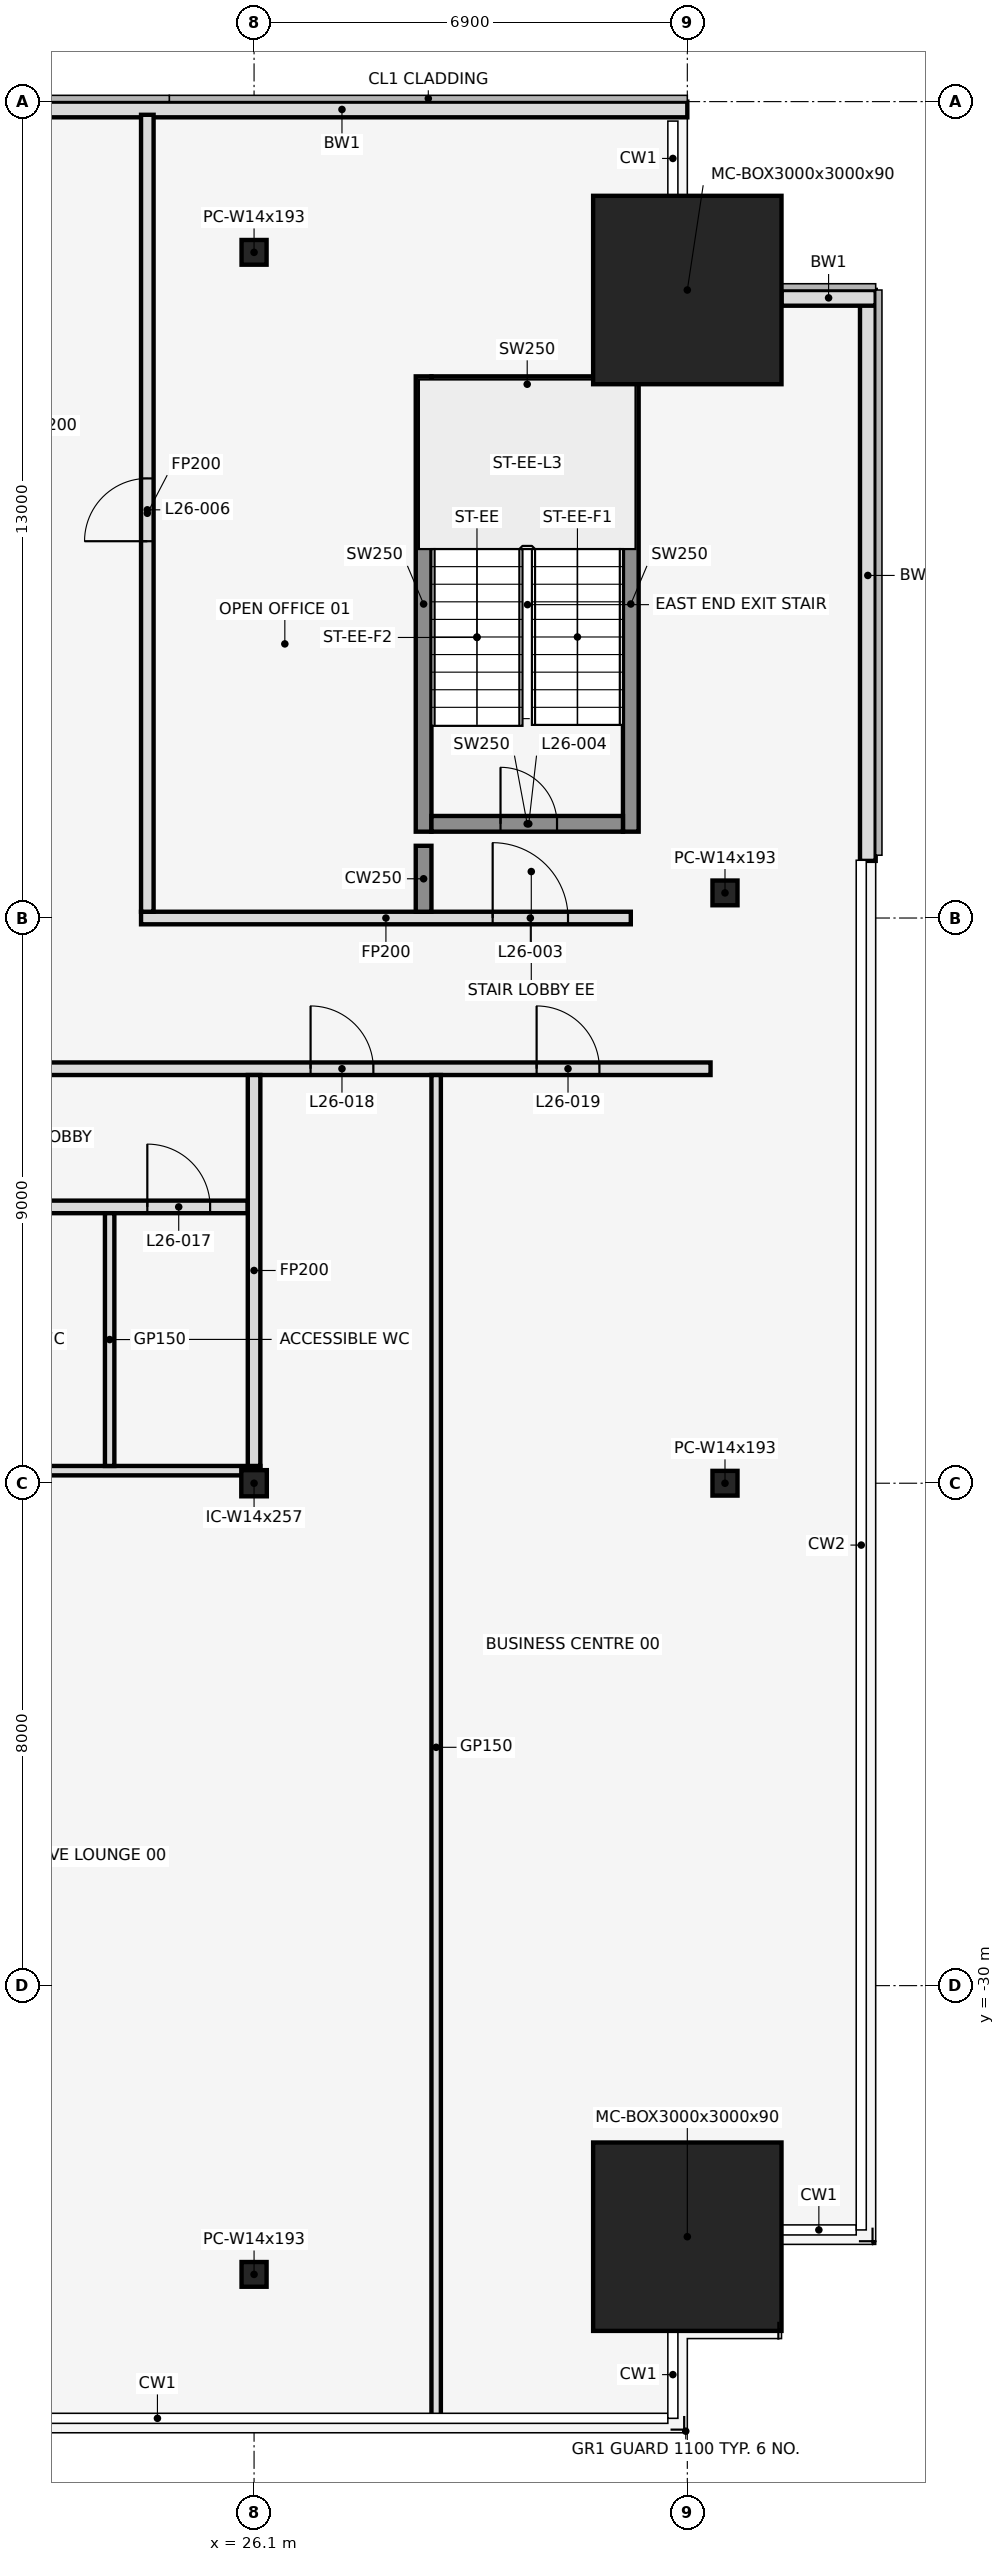
"""IFC4 building model, lengths in metres.
Left out: names, types, materials, properties, quantities, classifications, styles, units other than length and angle.
Written with IfcOpenShell. Run it as: python <this file> out.ifc"""

import sys

from ifc_helpers import new_model, si_unit, direction, frame, frame_2d, origin, origin_2d, place, context, subcontext, project, spatial, rectangle, hollow_rectangle, i_section, extrude, element, fill, save


model = new_model("IFC4")
c1 = context("Model", 3, precision=1e-05, world=origin(), true_north=direction((0.0, 1.0)))
c2 = subcontext(c1, "Body", "Model", "MODEL_VIEW")
j1 = project(units=[si_unit("LENGTHUNIT", "METRE"), si_unit("PLANEANGLEUNIT", "RADIAN")], contexts=[c1])
p1 = place(None, origin())
s1 = spatial("IfcSite", under=j1, at=p1, CompositionType="ELEMENT")
p2 = place(p1, origin())
s2 = spatial("IfcBuilding", under=s1, at=p2, CompositionType="ELEMENT")
p3 = place(p2, frame((0.0, 0.0, 122.7)))
s3 = spatial("IfcBuildingStorey", under=s2, at=p3, CompositionType="ELEMENT", Elevation=122.7)
for number, where, z_axis, x_axis in (
    (1, (26.1, -34.598, 0.0), (0.0, 0.0, 1.0), (1.0, 0.0, 0.0)),
    (2, (26.1, -2.4, 0.0), (0.0, 0.0, 1.0), (1.0, 0.0, 0.0)),
):
    element("IfcColumn", number, at=place(p3, frame(where, z_axis=z_axis, x_axis=x_axis)), inside=s3, PredefinedType="COLUMN", context=c2, shape_type="SweptSolid", body=[
        extrude(i_section(OverallWidth=0.399, OverallDepth=0.394, WebThickness=0.023, FlangeThickness=0.037, at=origin_2d()), origin(), (0.0, 0.0, 1.0), 4.1),
    ])
for number, where, z_axis, x_axis in (
    (3, (33.0, -33.998, 0.0), (0.0, 0.0, 1.0), (1.0, 0.0, 0.0)),
    (4, (33.0, -3.0, 0.0), (0.0, 0.0, 1.0), (1.0, 0.0, 0.0)),
):
    element("IfcColumn", number, at=place(p3, frame(where, z_axis=z_axis, x_axis=x_axis)), inside=s3, PredefinedType="COLUMN", context=c2, shape_type="SweptSolid", body=[
        extrude(hollow_rectangle(XDim=3.0, YDim=3.0, WallThickness=0.09, at=origin_2d()), origin(), (0.0, 0.0, 1.0), 4.1),
    ])
for number, where, z_axis, x_axis in (
    (5, (33.6, -12.6, 0.0), (0.0, 0.0, 1.0), (1.0, 0.0, 0.0)),
    (6, (33.6, -22.0, 0.0), (0.0, 0.0, 1.0), (1.0, 0.0, 0.0)),
):
    element("IfcColumn", number, at=place(p3, frame(where, z_axis=z_axis, x_axis=x_axis)), inside=s3, PredefinedType="COLUMN", context=c2, shape_type="SweptSolid", body=[
        extrude(i_section(OverallWidth=0.399, OverallDepth=0.394, WebThickness=0.023, FlangeThickness=0.037, at=origin_2d()), origin(), (0.0, 0.0, 1.0), 4.1),
    ])
p4 = place(p3, frame((26.1, -22.0, 0.0), z_axis=(0.0, 0.0, 1.0), x_axis=(1.0, 0.0, 0.0)))
e7 = element("IfcColumn", 7, at=p4, inside=s3, PredefinedType="COLUMN", context=c2, shape_type="SweptSolid", body=[
    extrude(i_section(OverallWidth=0.406, OverallDepth=0.417, WebThickness=0.03, FlangeThickness=0.048, at=origin_2d()), origin(), (0.0, 0.0, 1.0), 4.1),
])
p5 = place(p3, frame((33.0, -0.125, 0.0), z_axis=(0.0, 0.0, 1.0), x_axis=(-1.0, 0.0, 0.0)))
e8 = element("IfcWall", 8, at=p5, inside=s3, PredefinedType="STANDARD", context=c2, shape_type="SweptSolid", body=[
    extrude(rectangle(XDim=11.0, YDim=0.25, at=frame_2d((5.5, 0.0))), origin(), (0.0, 0.0, 1.0), 3.95),
])
p6 = place(p3, frame((35.875, -12.09, 0.0), z_axis=(0.0, 0.0, 1.0), x_axis=(0.0, 1.0, 0.0)))
e9 = element("IfcWall", 9, at=p6, inside=s3, PredefinedType="STANDARD", context=c2, shape_type="SweptSolid", body=[
    extrude(rectangle(XDim=9.09, YDim=0.25, at=frame_2d((4.545, 0.0))), origin(), (0.0, 0.0, 1.0), 3.95),
])
p7 = place(p3, frame((36.0, -3.125, 0.0), z_axis=(0.0, 0.0, 1.0), x_axis=(-1.0, 0.0, 0.0)))
e10 = element("IfcWall", 10, at=p7, inside=s3, PredefinedType="STANDARD", context=c2, shape_type="SweptSolid", body=[
    extrude(rectangle(XDim=1.5, YDim=0.25, at=frame_2d((0.75, 0.0))), origin(), (0.0, 0.0, 1.0), 3.95),
])
for number, where, z_axis, x_axis in (
    (11, (28.8, -11.625, 0.0), (0.0, 0.0, 1.0), (0.0, 1.0, 0.0)),
    (12, (32.1, -11.625, 0.0), (0.0, 0.0, 1.0), (0.0, 1.0, 0.0)),
):
    element("IfcWall", number, at=place(p3, frame(where, z_axis=z_axis, x_axis=x_axis)), inside=s3, PredefinedType="SHEAR", context=c2, shape_type="SweptSolid", body=[
        extrude(rectangle(XDim=7.25, YDim=0.25, at=frame_2d((3.625, 0.0))), origin(), (0.0, 0.0, 1.0), 4.1),
    ])
p8 = place(p3, frame((28.925, -11.5, 0.0), z_axis=(0.0, 0.0, 1.0), x_axis=(1.0, 0.0, 0.0)))
e13 = element("IfcWall", 13, at=p8, inside=s3, PredefinedType="SHEAR", context=c2, shape_type="SweptSolid", body=[
    extrude(rectangle(XDim=3.05, YDim=0.25, at=frame_2d((1.525, 0.0))), origin(), (0.0, 0.0, 1.0), 4.1),
])
p9 = place(p8, frame((1.1, 0.0, 0.0)))
e14 = element("IfcOpeningElement", 14, at=p9, cuts=e13, PredefinedType="OPENING", context=c2, shape_type="SweptSolid", body=[
    extrude(rectangle(XDim=0.9, YDim=2.1, at=frame_2d((0.45, 1.05))), frame((0.0, 0.137, 0.0), z_axis=(0.0, -1.0, 0.0), x_axis=(1.0, 0.0, 0.0)), (0.0, 0.0, 1.0), 0.274),
])
p10 = place(p3, frame((28.925, -4.5, 0.0), z_axis=(0.0, 0.0, 1.0), x_axis=(1.0, 0.0, 0.0)))
e15 = element("IfcWall", 15, at=p10, inside=s3, PredefinedType="SHEAR", context=c2, shape_type="SweptSolid", body=[
    extrude(rectangle(XDim=3.05, YDim=0.25, at=frame_2d((1.525, 0.0))), origin(), (0.0, 0.0, 1.0), 4.1),
])
p11 = place(p3, frame((17.5, -21.8, 0.0), z_axis=(0.0, 0.0, 1.0), x_axis=(1.0, 0.0, 0.0)))
e16 = element("IfcWall", 16, at=p11, inside=s3, PredefinedType="PARTITIONING", context=c2, shape_type="SweptSolid", body=[
    extrude(rectangle(XDim=8.7, YDim=0.15, at=frame_2d((4.35, 0.0))), origin(), (0.0, 0.0, 1.0), 3.018),
])
p12 = place(p3, frame((17.5, -17.6, 0.0), z_axis=(0.0, 0.0, 1.0), x_axis=(1.0, 0.0, 0.0)))
e17 = element("IfcWall", 17, at=p12, inside=s3, PredefinedType="PARTITIONING", context=c2, shape_type="SweptSolid", body=[
    extrude(rectangle(XDim=8.5, YDim=0.2, at=frame_2d((4.25, 0.0))), origin(), (0.0, 0.0, 1.0), 3.018),
])
p13 = place(p12, frame((1.1, 0.0, 0.0)))
e18 = element("IfcOpeningElement", 18, at=p13, cuts=e17, PredefinedType="OPENING", context=c2, shape_type="SweptSolid", body=[
    extrude(rectangle(XDim=0.9, YDim=2.1, at=frame_2d((0.45, 1.05))), frame((0.0, 0.112, 0.0), z_axis=(0.0, -1.0, 0.0), x_axis=(1.0, 0.0, 0.0)), (0.0, 0.0, 1.0), 0.224),
])
p14 = place(p12, frame((4.3, 0.0, 0.0)))
e19 = element("IfcOpeningElement", 19, at=p14, cuts=e17, PredefinedType="OPENING", context=c2, shape_type="SweptSolid", body=[
    extrude(rectangle(XDim=0.9, YDim=2.1, at=frame_2d((0.45, 1.05))), frame((0.0, 0.112, 0.0), z_axis=(0.0, -1.0, 0.0), x_axis=(1.0, 0.0, 0.0)), (0.0, 0.0, 1.0), 0.224),
])
p15 = place(p12, frame((6.9, 0.0, 0.0)))
e20 = element("IfcOpeningElement", 20, at=p15, cuts=e17, PredefinedType="OPENING", context=c2, shape_type="SweptSolid", body=[
    extrude(rectangle(XDim=1.0, YDim=2.1, at=frame_2d((0.5, 1.05))), frame((0.0, 0.112, 0.0), z_axis=(0.0, -1.0, 0.0), x_axis=(1.0, 0.0, 0.0)), (0.0, 0.0, 1.0), 0.224),
])
p16 = place(p3, frame((-33.37, -15.4, 0.0), z_axis=(0.0, 0.0, 1.0), x_axis=(1.0, 0.0, 0.0)))
e21 = element("IfcWall", 21, at=p16, inside=s3, PredefinedType="PARTITIONING", context=c2, shape_type="SweptSolid", body=[
    extrude(rectangle(XDim=66.74, YDim=0.2, at=frame_2d((33.37, 0.0))), origin(), (0.0, 0.0, 1.0), 3.018),
])
p17 = place(p16, frame((1.7, 0.0, 0.0)))
e22 = element("IfcOpeningElement", 22, at=p17, cuts=e21, PredefinedType="OPENING", context=c2, shape_type="SweptSolid", body=[
    extrude(rectangle(XDim=1.0, YDim=2.1, at=frame_2d((0.5, 1.05))), frame((0.0, 0.112, 0.0), z_axis=(0.0, -1.0, 0.0), x_axis=(1.0, 0.0, 0.0)), (0.0, 0.0, 1.0), 0.224),
])
p18 = place(p16, frame((11.07, 0.0, 0.0)))
e23 = element("IfcOpeningElement", 23, at=p18, cuts=e21, PredefinedType="OPENING", context=c2, shape_type="SweptSolid", body=[
    extrude(rectangle(XDim=1.0, YDim=2.1, at=frame_2d((0.5, 1.05))), frame((0.0, 0.112, 0.0), z_axis=(0.0, -1.0, 0.0), x_axis=(1.0, 0.0, 0.0)), (0.0, 0.0, 1.0), 0.224),
])
p19 = place(p16, frame((20.87, 0.0, 0.0)))
e24 = element("IfcOpeningElement", 24, at=p19, cuts=e21, PredefinedType="OPENING", context=c2, shape_type="SweptSolid", body=[
    extrude(rectangle(XDim=1.8, YDim=2.1, at=frame_2d((0.9, 1.05))), frame((0.0, 0.112, 0.0), z_axis=(0.0, -1.0, 0.0), x_axis=(1.0, 0.0, 0.0)), (0.0, 0.0, 1.0), 0.224),
])
p20 = place(p16, frame((28.57, 0.0, 0.0)))
e25 = element("IfcOpeningElement", 25, at=p20, cuts=e21, PredefinedType="OPENING", context=c2, shape_type="SweptSolid", body=[
    extrude(rectangle(XDim=1.0, YDim=2.1, at=frame_2d((0.5, 1.05))), frame((0.0, 0.112, 0.0), z_axis=(0.0, -1.0, 0.0), x_axis=(1.0, 0.0, 0.0)), (0.0, 0.0, 1.0), 0.224),
])
p21 = place(p16, frame((36.77, 0.0, 0.0)))
e26 = element("IfcOpeningElement", 26, at=p21, cuts=e21, PredefinedType="OPENING", context=c2, shape_type="SweptSolid", body=[
    extrude(rectangle(XDim=1.8, YDim=2.1, at=frame_2d((0.9, 1.05))), frame((0.0, 0.112, 0.0), z_axis=(0.0, -1.0, 0.0), x_axis=(1.0, 0.0, 0.0)), (0.0, 0.0, 1.0), 0.224),
])
p22 = place(p16, frame((44.47, 0.0, 0.0)))
e27 = element("IfcOpeningElement", 27, at=p22, cuts=e21, PredefinedType="OPENING", context=c2, shape_type="SweptSolid", body=[
    extrude(rectangle(XDim=1.0, YDim=2.1, at=frame_2d((0.5, 1.05))), frame((0.0, 0.112, 0.0), z_axis=(0.0, -1.0, 0.0), x_axis=(1.0, 0.0, 0.0)), (0.0, 0.0, 1.0), 0.224),
])
p23 = place(p16, frame((48.77, 0.0, 0.0)))
e28 = element("IfcOpeningElement", 28, at=p23, cuts=e21, PredefinedType="OPENING", context=c2, shape_type="SweptSolid", body=[
    extrude(rectangle(XDim=1.0, YDim=2.1, at=frame_2d((0.5, 1.05))), frame((0.0, 0.112, 0.0), z_axis=(0.0, -1.0, 0.0), x_axis=(1.0, 0.0, 0.0)), (0.0, 0.0, 1.0), 0.224),
])
p24 = place(p16, frame((54.67, 0.0, 0.0)))
e29 = element("IfcOpeningElement", 29, at=p24, cuts=e21, PredefinedType="OPENING", context=c2, shape_type="SweptSolid", body=[
    extrude(rectangle(XDim=0.9, YDim=2.1, at=frame_2d((0.45, 1.05))), frame((0.0, 0.112, 0.0), z_axis=(0.0, -1.0, 0.0), x_axis=(1.0, 0.0, 0.0)), (0.0, 0.0, 1.0), 0.224),
])
p25 = place(p16, frame((60.37, 0.0, 0.0)))
e30 = element("IfcOpeningElement", 30, at=p25, cuts=e21, PredefinedType="OPENING", context=c2, shape_type="SweptSolid", body=[
    extrude(rectangle(XDim=1.0, YDim=2.1, at=frame_2d((0.5, 1.05))), frame((0.0, 0.112, 0.0), z_axis=(0.0, -1.0, 0.0), x_axis=(1.0, 0.0, 0.0)), (0.0, 0.0, 1.0), 0.224),
])
p26 = place(p16, frame((63.97, 0.0, 0.0)))
e31 = element("IfcOpeningElement", 31, at=p26, cuts=e21, PredefinedType="OPENING", context=c2, shape_type="SweptSolid", body=[
    extrude(rectangle(XDim=1.0, YDim=2.1, at=frame_2d((0.5, 1.05))), frame((0.0, 0.112, 0.0), z_axis=(0.0, -1.0, 0.0), x_axis=(1.0, 0.0, 0.0)), (0.0, 0.0, 1.0), 0.224),
])
p27 = place(p3, frame((24.3, -13.0, 0.0), z_axis=(0.0, 0.0, 1.0), x_axis=(1.0, 0.0, 0.0)))
e32 = element("IfcWall", 32, at=p27, inside=s3, PredefinedType="PARTITIONING", context=c2, shape_type="SweptSolid", body=[
    extrude(rectangle(XDim=7.8, YDim=0.2, at=frame_2d((3.9, 0.0))), origin(), (0.0, 0.0, 1.0), 3.018),
])
p28 = place(p27, frame((5.6, 0.0, 0.0)))
e33 = element("IfcOpeningElement", 33, at=p28, cuts=e32, PredefinedType="OPENING", context=c2, shape_type="SweptSolid", body=[
    extrude(rectangle(XDim=1.2, YDim=2.1, at=frame_2d((0.6, 1.05))), frame((0.0, 0.112, 0.0), z_axis=(0.0, -1.0, 0.0), x_axis=(1.0, 0.0, 0.0)), (0.0, 0.0, 1.0), 0.224),
])
p29 = place(p3, frame((23.8, -21.725, 0.0), z_axis=(0.0, 0.0, 1.0), x_axis=(0.0, 1.0, 0.0)))
e34 = element("IfcWall", 34, at=p29, inside=s3, PredefinedType="PARTITIONING", context=c2, shape_type="SweptSolid", body=[
    extrude(rectangle(XDim=4.025, YDim=0.15, at=frame_2d((2.013, 0.0))), origin(), (0.0, 0.0, 1.0), 3.018),
])
p30 = place(p3, frame((24.4, -12.9, 0.0), z_axis=(0.0, 0.0, 1.0), x_axis=(0.0, 1.0, 0.0)))
e35 = element("IfcWall", 35, at=p30, inside=s3, PredefinedType="PARTITIONING", context=c2, shape_type="SweptSolid", body=[
    extrude(rectangle(XDim=12.69, YDim=0.2, at=frame_2d((6.345, 0.0))), origin(), (0.0, 0.0, 1.0), 3.018),
])
p31 = place(p30, frame((5.9, 0.0, 0.0)))
e36 = element("IfcOpeningElement", 36, at=p31, cuts=e35, PredefinedType="OPENING", context=c2, shape_type="SweptSolid", body=[
    extrude(rectangle(XDim=1.0, YDim=2.1, at=frame_2d((0.5, 1.05))), frame((0.0, 0.112, 0.0), z_axis=(0.0, -1.0, 0.0), x_axis=(1.0, 0.0, 0.0)), (0.0, 0.0, 1.0), 0.224),
])
p32 = place(p3, frame((26.1, -21.725, 0.0), z_axis=(0.0, 0.0, 1.0), x_axis=(0.0, 1.0, 0.0)))
e37 = element("IfcWall", 37, at=p32, inside=s3, PredefinedType="PARTITIONING", context=c2, shape_type="SweptSolid", body=[
    extrude(rectangle(XDim=6.225, YDim=0.2, at=frame_2d((3.113, 0.0))), origin(), (0.0, 0.0, 1.0), 3.018),
])
p33 = place(p3, frame((28.8, -12.9, 0.0), z_axis=(0.0, 0.0, 1.0), x_axis=(0.0, 1.0, 0.0)))
e38 = element("IfcWall", 38, at=p33, inside=s3, PredefinedType="SHEAR", context=c2, shape_type="SweptSolid", body=[
    extrude(rectangle(XDim=1.05, YDim=0.25, at=frame_2d((0.525, 0.0))), origin(), (0.0, 0.0, 1.0), 4.1),
])
p34 = place(p3, frame((29.0, -36.91, 0.0), z_axis=(0.0, 0.0, 1.0), x_axis=(0.0, 1.0, 0.0)))
e39 = element("IfcWall", 39, at=p34, inside=s3, PredefinedType="PARTITIONING", context=c2, shape_type="SweptSolid", body=[
    extrude(rectangle(XDim=21.41, YDim=0.15, at=frame_2d((10.705, 0.0))), origin(), (0.0, 0.0, 1.0), 3.018),
])
p35 = place(p28, origin())
e40 = element("IfcDoor", 40, at=p35, inside=s3, OperationType="SINGLE_SWING_RIGHT", PredefinedType="DOOR", context=c2, shape_type="SweptSolid", body=[
    extrude(rectangle(XDim=1.2, YDim=2.1, at=frame_2d((0.6, 1.05))), frame((0.0, 0.025, 0.0), z_axis=(0.0, -1.0, 0.0), x_axis=(1.0, 0.0, 0.0)), (0.0, 0.0, 1.0), 0.05),
])
fill(e33, e40)
p36 = place(p9, origin())
e41 = element("IfcDoor", 41, at=p36, inside=s3, OperationType="SINGLE_SWING_LEFT", PredefinedType="DOOR", context=c2, shape_type="SweptSolid", body=[
    extrude(rectangle(XDim=0.9, YDim=2.1, at=frame_2d((0.45, 1.05))), frame((0.0, 0.025, 0.0), z_axis=(0.0, -1.0, 0.0), x_axis=(1.0, 0.0, 0.0)), (0.0, 0.0, 1.0), 0.05),
])
fill(e14, e41)
p37 = place(p31, frame((1.0, 0.0, 0.0), z_axis=(0.0, 0.0, 1.0), x_axis=(-1.0, 0.0, 0.0)))
e42 = element("IfcDoor", 42, at=p37, inside=s3, OperationType="SINGLE_SWING_RIGHT", PredefinedType="DOOR", context=c2, shape_type="SweptSolid", body=[
    extrude(rectangle(XDim=1.0, YDim=2.1, at=frame_2d((0.5, 1.05))), frame((0.0, 0.025, 0.0), z_axis=(0.0, -1.0, 0.0), x_axis=(1.0, 0.0, 0.0)), (0.0, 0.0, 1.0), 0.05),
])
fill(e36, e42)
p38 = place(p15, frame((1.0, 0.0, 0.0), z_axis=(0.0, 0.0, 1.0), x_axis=(-1.0, 0.0, 0.0)))
e43 = element("IfcDoor", 43, at=p38, inside=s3, OperationType="SINGLE_SWING_RIGHT", PredefinedType="DOOR", context=c2, shape_type="SweptSolid", body=[
    extrude(rectangle(XDim=1.0, YDim=2.1, at=frame_2d((0.5, 1.05))), frame((0.0, 0.025, 0.0), z_axis=(0.0, -1.0, 0.0), x_axis=(1.0, 0.0, 0.0)), (0.0, 0.0, 1.0), 0.05),
])
fill(e20, e43)
p39 = place(p25, frame((1.0, 0.0, 0.0), z_axis=(0.0, 0.0, 1.0), x_axis=(-1.0, 0.0, 0.0)))
e44 = element("IfcDoor", 44, at=p39, inside=s3, OperationType="SINGLE_SWING_RIGHT", PredefinedType="DOOR", context=c2, shape_type="SweptSolid", body=[
    extrude(rectangle(XDim=1.0, YDim=2.1, at=frame_2d((0.5, 1.05))), frame((0.0, 0.025, 0.0), z_axis=(0.0, -1.0, 0.0), x_axis=(1.0, 0.0, 0.0)), (0.0, 0.0, 1.0), 0.05),
])
fill(e30, e44)
p40 = place(p26, frame((1.0, 0.0, 0.0), z_axis=(0.0, 0.0, 1.0), x_axis=(-1.0, 0.0, 0.0)))
e45 = element("IfcDoor", 45, at=p40, inside=s3, OperationType="SINGLE_SWING_LEFT", PredefinedType="DOOR", context=c2, shape_type="SweptSolid", body=[
    extrude(rectangle(XDim=1.0, YDim=2.1, at=frame_2d((0.5, 1.05))), frame((0.0, 0.025, 0.0), z_axis=(0.0, -1.0, 0.0), x_axis=(1.0, 0.0, 0.0)), (0.0, 0.0, 1.0), 0.05),
])
fill(e31, e45)
save(model, sys.argv[1])
